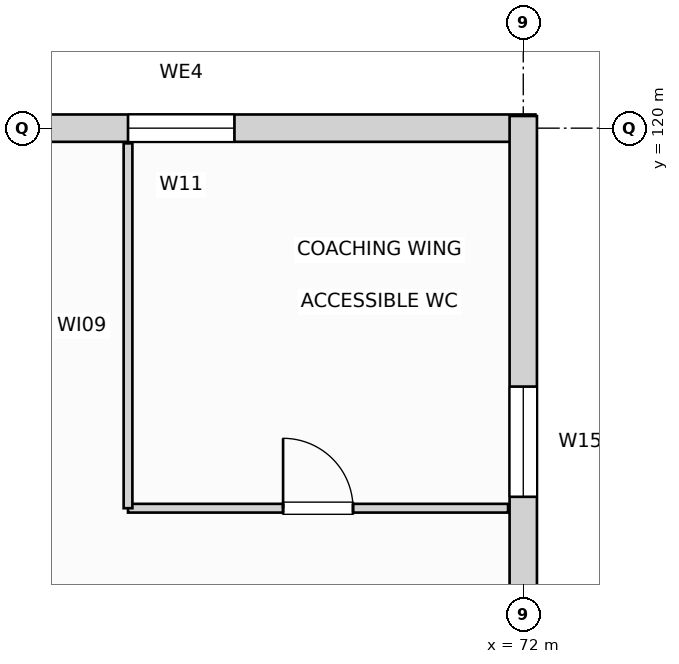
"""IFC4 building model, lengths in metres.
Left out: names, types, materials, properties, quantities, classifications, styles, units other than length and angle.
Written with IfcOpenShell. Run it as: python <this file> out.ifc"""

import sys

from ifc_helpers import new_model, si_unit, direction, frame, frame_2d, origin, place, context, subcontext, project, spatial, rectangle, extrude, element, fill, save


model = new_model("IFC4")
c1 = context("Model", 3, precision=1e-05, world=origin(), true_north=direction((0.0, 1.0)))
c2 = subcontext(c1, "Body", "Model", "MODEL_VIEW")
j1 = project(units=[si_unit("LENGTHUNIT", "METRE"), si_unit("PLANEANGLEUNIT", "RADIAN")], contexts=[c1])
p1 = place(None, origin())
s1 = spatial("IfcSite", under=j1, at=p1, CompositionType="ELEMENT")
p2 = place(p1, origin())
s2 = spatial("IfcBuilding", under=s1, at=p2, CompositionType="ELEMENT")
p3 = place(p2, frame((0.0, 0.0, 11.4)))
s3 = spatial("IfcBuildingStorey", under=s2, at=p3, CompositionType="ELEMENT", Elevation=11.4)
p4 = place(p3, frame((62.84, 120.0, 0.0), z_axis=(0.0, 0.0, 1.0), x_axis=(1.0, 0.0, 0.0)))
e1 = element("IfcWall", 1, at=p4, inside=s3, PredefinedType="SOLIDWALL", context=c2, shape_type="SweptSolid", body=[
    extrude(rectangle(XDim=9.32, YDim=0.36, at=frame_2d((4.66, 0.0))), origin(), (0.0, 0.0, 1.0), 5.085),
])
p5 = place(p4, frame((3.96, 0.0, 0.85)))
e2 = element("IfcOpeningElement", 2, at=p5, cuts=e1, PredefinedType="OPENING", context=c2, shape_type="SweptSolid", body=[
    extrude(rectangle(XDim=1.4, YDim=2.1, at=frame_2d((0.7, 1.05))), frame((0.0, 0.19, 0.0), z_axis=(0.0, -1.0, 0.0), x_axis=(1.0, 0.0, 0.0)), (0.0, 0.0, 1.0), 0.38),
])
p6 = place(p3, frame((72.0, 111.59, 0.0), z_axis=(0.0, 0.0, 1.0), x_axis=(0.0, 1.0, 0.0)))
e3 = element("IfcWall", 3, at=p6, inside=s3, PredefinedType="SOLIDWALL", context=c2, shape_type="SweptSolid", body=[
    extrude(rectangle(XDim=8.57, YDim=0.36, at=frame_2d((4.285, 0.0))), origin(), (0.0, 0.0, 1.0), 5.085),
])
p7 = place(p6, frame((3.56, 0.0, 0.85)))
e4 = element("IfcOpeningElement", 4, at=p7, cuts=e3, PredefinedType="OPENING", context=c2, shape_type="SweptSolid", body=[
    extrude(rectangle(XDim=1.45, YDim=1.95, at=frame_2d((0.725, 0.975))), frame((0.0, 0.19, 0.0), z_axis=(0.0, -1.0, 0.0), x_axis=(1.0, 0.0, 0.0)), (0.0, 0.0, 1.0), 0.38),
])
p8 = place(p3, frame((66.8, 115.0, 0.0), z_axis=(0.0, 0.0, 1.0), x_axis=(1.0, 0.0, 0.0)))
e5 = element("IfcWall", 5, at=p8, inside=s3, PredefinedType="PARTITIONING", context=c2, shape_type="SweptSolid", body=[
    extrude(rectangle(XDim=5.0, YDim=0.115, at=frame_2d((2.5, 0.0))), origin(), (0.0, 0.0, 1.0), 5.085),
])
p9 = place(p8, frame((2.04, 0.0, 0.0)))
e6 = element("IfcOpeningElement", 6, at=p9, cuts=e5, PredefinedType="OPENING", context=c2, shape_type="SweptSolid", body=[
    extrude(rectangle(XDim=0.92, YDim=2.08, at=frame_2d((0.46, 1.04))), frame((0.0, 0.067, 0.0), z_axis=(0.0, -1.0, 0.0), x_axis=(1.0, 0.0, 0.0)), (0.0, 0.0, 1.0), 0.135),
])
p10 = place(p3, frame((66.8, 115.0, 0.0), z_axis=(0.0, 0.0, 1.0), x_axis=(0.0, 1.0, 0.0)))
e7 = element("IfcWall", 7, at=p10, inside=s3, PredefinedType="PARTITIONING", context=c2, shape_type="SweptSolid", body=[
    extrude(rectangle(XDim=4.8, YDim=0.115, at=frame_2d((2.4, 0.0))), origin(), (0.0, 0.0, 1.0), 5.085),
])
p11 = place(p5, origin())
e8 = element("IfcWindow", 8, at=p11, inside=s3, PartitioningType="SINGLE_PANEL", PredefinedType="WINDOW", context=c2, shape_type="SweptSolid", body=[
    extrude(rectangle(XDim=1.4, YDim=2.1, at=frame_2d((0.7, 1.05))), frame((0.0, 0.03, 0.0), z_axis=(0.0, -1.0, 0.0), x_axis=(1.0, 0.0, 0.0)), (0.0, 0.0, 1.0), 0.06),
])
fill(e2, e8)
p12 = place(p7, origin())
e9 = element("IfcWindow", 9, at=p12, inside=s3, PartitioningType="SINGLE_PANEL", PredefinedType="WINDOW", context=c2, shape_type="SweptSolid", body=[
    extrude(rectangle(XDim=1.45, YDim=1.95, at=frame_2d((0.725, 0.975))), frame((0.0, 0.03, 0.0), z_axis=(0.0, -1.0, 0.0), x_axis=(1.0, 0.0, 0.0)), (0.0, 0.0, 1.0), 0.06),
])
fill(e4, e9)
p13 = place(p9, origin())
e10 = element("IfcDoor", 10, at=p13, inside=s3, OperationType="SINGLE_SWING_LEFT", PredefinedType="DOOR", context=c2, shape_type="SweptSolid", body=[
    extrude(rectangle(XDim=0.92, YDim=2.08, at=frame_2d((0.46, 1.04))), frame((0.0, 0.025, 0.0), z_axis=(0.0, -1.0, 0.0), x_axis=(1.0, 0.0, 0.0)), (0.0, 0.0, 1.0), 0.05),
])
fill(e6, e10)
save(model, sys.argv[1])
